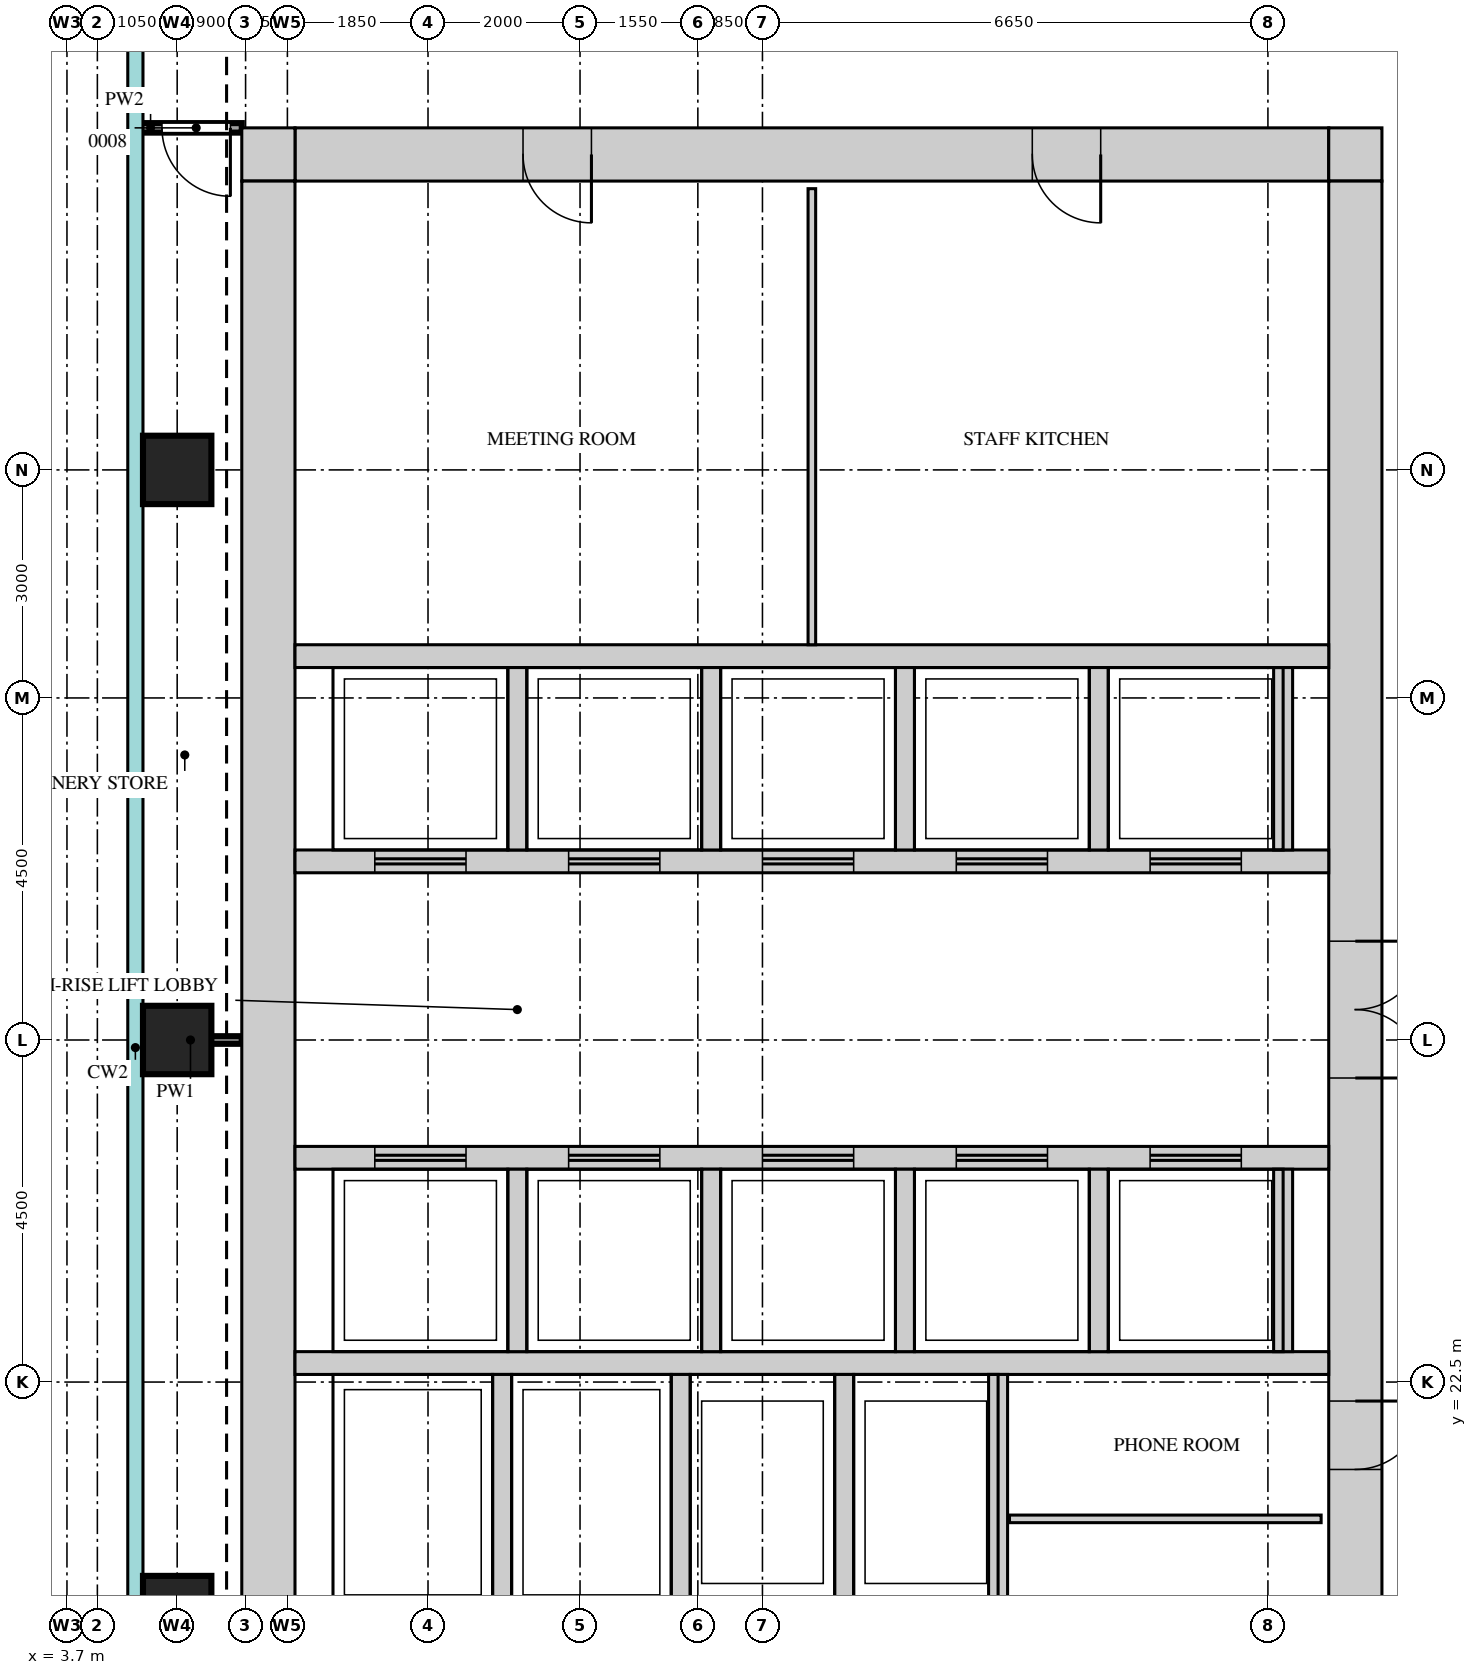
"""IFC4 building model, lengths in metres.
Left out: names, types, materials, properties, quantities, classifications, styles, units other than length and angle.
Written with IfcOpenShell. Run it as: python <this file> out.ifc"""

import sys

from ifc_helpers import new_model, si_unit, direction, frame, frame_2d, origin, origin_2d, place, context, subcontext, project, spatial, rectangle, extrude, source, transform, mapped, element, fill, save


model = new_model("IFC4")
c1 = context("Model", 3, precision=1e-05, world=origin(), true_north=direction((0.0, 1.0)))
c2 = subcontext(c1, "Body", "Model", "MODEL_VIEW")
j1 = project(units=[si_unit("LENGTHUNIT", "METRE"), si_unit("PLANEANGLEUNIT", "RADIAN")], contexts=[c1])
p1 = place(None, origin())
s1 = spatial("IfcSite", under=j1, at=p1, CompositionType="ELEMENT")
p2 = place(p1, origin())
s2 = spatial("IfcBuilding", under=s1, at=p2, CompositionType="ELEMENT")
p3 = place(p2, frame((0.0, 0.0, 226.2)))
s3 = spatial("IfcBuildingStorey", under=s2, at=p3, CompositionType="ELEMENT", Elevation=226.2)
m1 = source(origin(), c2, "Body", "SweptSolid", [
    extrude(rectangle(XDim=13.6, YDim=0.7, at=frame_2d((6.8, 0.0))), origin(), (0.0, 0.0, 1.0), 3.75),
])
p4 = place(p3, frame((6.7, 38.65, 0.0), z_axis=(0.0, 0.0, 1.0), x_axis=(1.0, 0.0, 0.0)))
e1 = element("IfcWall", 1, at=p4, inside=s3, PredefinedType="SHEAR", context=c2, shape_type="MappedRepresentation", body=[
    mapped(m1, transform((0.0, 0.0, 0.0))),
])
m2 = source(origin(), c2, "Body", "SweptSolid", [
    extrude(rectangle(XDim=0.9, YDim=2.1, at=frame_2d((0.45, 1.05))), frame((0.0, 0.36, 0.0), z_axis=(0.0, -1.0, 0.0), x_axis=(1.0, 0.0, 0.0)), (0.0, 0.0, 1.0), 0.72),
])
p5 = place(p4, frame((3.0, 0.0, 0.0)))
e2 = element("IfcOpeningElement", 2, at=p5, cuts=e1, PredefinedType="OPENING", context=c2, shape_type="MappedRepresentation", body=[
    mapped(m2, transform((0.0, 0.0, 0.0))),
])
p6 = place(p4, frame((9.7, 0.0, 0.0)))
e3 = element("IfcOpeningElement", 3, at=p6, cuts=e1, PredefinedType="OPENING", context=c2, shape_type="MappedRepresentation", body=[
    mapped(m2, transform((0.0, 0.0, 0.0))),
])
m3 = source(origin(), c2, "Body", "SweptSolid", [
    extrude(rectangle(XDim=0.7, YDim=0.7, at=frame_2d((0.35, 0.0))), origin(), (0.0, 0.0, 1.0), 3.75),
])
for number, where, z_axis, x_axis in (
    (4, (20.3, 38.65, 0.0), (0.0, 0.0, 1.0), (1.0, 0.0, 0.0)),
    (5, (6.0, 38.65, 0.0), (0.0, 0.0, 1.0), (1.0, 0.0, 0.0)),
):
    element("IfcWall", number, at=place(p3, frame(where, z_axis=z_axis, x_axis=x_axis)), inside=s3, PredefinedType="SHEAR", context=c2, shape_type="MappedRepresentation", body=[
        mapped(m3, transform((0.0, 0.0, 0.0))),
    ])
m4 = source(origin(), c2, "Body", "SweptSolid", [
    extrude(rectangle(XDim=22.6, YDim=0.7, at=frame_2d((11.3, 0.0))), origin(), (0.0, 0.0, 1.0), 3.75),
])
p7 = place(p3, frame((20.65, 15.7, 0.0), z_axis=(0.0, 0.0, 1.0), x_axis=(0.0, 1.0, 0.0)))
e6 = element("IfcWall", 6, at=p7, inside=s3, PredefinedType="SHEAR", context=c2, shape_type="MappedRepresentation", body=[
    mapped(m4, transform((0.0, 0.0, 0.0))),
])
m5 = source(origin(), c2, "Body", "SweptSolid", [
    extrude(rectangle(XDim=1.8, YDim=2.1, at=frame_2d((0.9, 1.05))), frame((0.0, 0.36, 0.0), z_axis=(0.0, -1.0, 0.0), x_axis=(1.0, 0.0, 0.0)), (0.0, 0.0, 1.0), 0.72),
])
p8 = place(p7, frame((10.8, 0.0, 0.0)))
e7 = element("IfcOpeningElement", 7, at=p8, cuts=e6, PredefinedType="OPENING", context=c2, shape_type="MappedRepresentation", body=[
    mapped(m5, transform((0.0, 0.0, 0.0))),
])
p9 = place(p7, frame((0.45, 0.0, 0.0)))
e8 = element("IfcOpeningElement", 8, at=p9, cuts=e6, PredefinedType="OPENING", context=c2, shape_type="MappedRepresentation", body=[
    mapped(m2, transform((0.0, 0.0, 0.0))),
])
p10 = place(p7, frame((2.9, 0.0, 0.0)))
e9 = element("IfcOpeningElement", 9, at=p10, cuts=e6, PredefinedType="OPENING", context=c2, shape_type="MappedRepresentation", body=[
    mapped(m2, transform((0.0, 0.0, 0.0))),
])
p11 = place(p7, frame((5.65, 0.0, 0.0)))
e10 = element("IfcOpeningElement", 10, at=p11, cuts=e6, PredefinedType="OPENING", context=c2, shape_type="MappedRepresentation", body=[
    mapped(m2, transform((0.0, 0.0, 0.0))),
])
p12 = place(p3, frame((6.35, 15.7, 0.0), z_axis=(0.0, 0.0, 1.0), x_axis=(0.0, 1.0, 0.0)))
e11 = element("IfcWall", 11, at=p12, inside=s3, PredefinedType="SHEAR", context=c2, shape_type="MappedRepresentation", body=[
    mapped(m4, transform((0.0, 0.0, 0.0))),
])
m6 = source(origin(), c2, "Body", "SweptSolid", [
    extrude(rectangle(XDim=13.6, YDim=0.3, at=frame_2d((6.8, 0.0))), origin(), (0.0, 0.0, 1.0), 3.75),
])
for number, where, z_axis, x_axis in (
    (12, (6.7, 22.75, 0.0), (0.0, 0.0, 1.0), (1.0, 0.0, 0.0)),
    (13, (6.7, 32.05, 0.0), (0.0, 0.0, 1.0), (1.0, 0.0, 0.0)),
):
    element("IfcWall", number, at=place(p3, frame(where, z_axis=z_axis, x_axis=x_axis)), inside=s3, PredefinedType="STANDARD", context=c2, shape_type="MappedRepresentation", body=[
        mapped(m6, transform((0.0, 0.0, 0.0))),
    ])
p13 = place(p3, frame((6.7, 29.35, 0.0), z_axis=(0.0, 0.0, 1.0), x_axis=(1.0, 0.0, 0.0)))
e14 = element("IfcWall", 14, at=p13, inside=s3, PredefinedType="STANDARD", context=c2, shape_type="MappedRepresentation", body=[
    mapped(m6, transform((0.0, 0.0, 0.0))),
])
m7 = source(origin(), c2, "Body", "SweptSolid", [
    extrude(rectangle(XDim=1.2, YDim=2.1, at=frame_2d((0.6, 1.05))), frame((0.0, 0.16, 0.0), z_axis=(0.0, -1.0, 0.0), x_axis=(1.0, 0.0, 0.0)), (0.0, 0.0, 1.0), 0.32),
])
p14 = place(p13, frame((1.05, 0.0, 0.0)))
e15 = element("IfcOpeningElement", 15, at=p14, cuts=e14, PredefinedType="OPENING", context=c2, shape_type="MappedRepresentation", body=[
    mapped(m7, transform((0.0, 0.0, 0.0))),
])
p15 = place(p13, frame((3.6, 0.0, 0.0)))
e16 = element("IfcOpeningElement", 16, at=p15, cuts=e14, PredefinedType="OPENING", context=c2, shape_type="MappedRepresentation", body=[
    mapped(m7, transform((0.0, 0.0, 0.0))),
])
p16 = place(p13, frame((6.15, 0.0, 0.0)))
e17 = element("IfcOpeningElement", 17, at=p16, cuts=e14, PredefinedType="OPENING", context=c2, shape_type="MappedRepresentation", body=[
    mapped(m7, transform((0.0, 0.0, 0.0))),
])
p17 = place(p13, frame((8.7, 0.0, 0.0)))
e18 = element("IfcOpeningElement", 18, at=p17, cuts=e14, PredefinedType="OPENING", context=c2, shape_type="MappedRepresentation", body=[
    mapped(m7, transform((0.0, 0.0, 0.0))),
])
p18 = place(p13, frame((11.25, 0.0, 0.0)))
e19 = element("IfcOpeningElement", 19, at=p18, cuts=e14, PredefinedType="OPENING", context=c2, shape_type="MappedRepresentation", body=[
    mapped(m7, transform((0.0, 0.0, 0.0))),
])
p19 = place(p3, frame((6.7, 25.45, 0.0), z_axis=(0.0, 0.0, 1.0), x_axis=(1.0, 0.0, 0.0)))
e20 = element("IfcWall", 20, at=p19, inside=s3, PredefinedType="STANDARD", context=c2, shape_type="MappedRepresentation", body=[
    mapped(m6, transform((0.0, 0.0, 0.0))),
])
p20 = place(p19, frame((1.05, 0.0, 0.0)))
e21 = element("IfcOpeningElement", 21, at=p20, cuts=e20, PredefinedType="OPENING", context=c2, shape_type="MappedRepresentation", body=[
    mapped(m7, transform((0.0, 0.0, 0.0))),
])
p21 = place(p19, frame((3.6, 0.0, 0.0)))
e22 = element("IfcOpeningElement", 22, at=p21, cuts=e20, PredefinedType="OPENING", context=c2, shape_type="MappedRepresentation", body=[
    mapped(m7, transform((0.0, 0.0, 0.0))),
])
p22 = place(p19, frame((6.15, 0.0, 0.0)))
e23 = element("IfcOpeningElement", 23, at=p22, cuts=e20, PredefinedType="OPENING", context=c2, shape_type="MappedRepresentation", body=[
    mapped(m7, transform((0.0, 0.0, 0.0))),
])
p23 = place(p19, frame((8.7, 0.0, 0.0)))
e24 = element("IfcOpeningElement", 24, at=p23, cuts=e20, PredefinedType="OPENING", context=c2, shape_type="MappedRepresentation", body=[
    mapped(m7, transform((0.0, 0.0, 0.0))),
])
p24 = place(p19, frame((11.25, 0.0, 0.0)))
e25 = element("IfcOpeningElement", 25, at=p24, cuts=e20, PredefinedType="OPENING", context=c2, shape_type="MappedRepresentation", body=[
    mapped(m7, transform((0.0, 0.0, 0.0))),
])
m8 = source(origin(), c2, "Body", "SweptSolid", [
    extrude(rectangle(XDim=3.1, YDim=0.25, at=frame_2d((1.55, 0.0))), origin(), (0.0, 0.0, 1.0), 3.75),
])
for number, where, z_axis, x_axis in (
    (26, (9.425, 19.5, 0.0), (0.0, 0.0, 1.0), (0.0, 1.0, 0.0)),
    (27, (11.775, 19.5, 0.0), (0.0, 0.0, 1.0), (0.0, 1.0, 0.0)),
    (28, (13.925, 19.5, 0.0), (0.0, 0.0, 1.0), (0.0, 1.0, 0.0)),
    (29, (15.95, 19.5, 0.0), (0.0, 0.0, 1.0), (0.0, 1.0, 0.0)),
):
    element("IfcWall", number, at=place(p3, frame(where, z_axis=z_axis, x_axis=x_axis)), inside=s3, PredefinedType="STANDARD", context=c2, shape_type="MappedRepresentation", body=[
        mapped(m8, transform((0.0, 0.0, 0.0))),
    ])
m9 = source(origin(), c2, "Body", "SweptSolid", [
    extrude(rectangle(XDim=2.4, YDim=0.25, at=frame_2d((1.2, 0.0))), origin(), (0.0, 0.0, 1.0), 3.75),
])
for number, where, z_axis, x_axis in (
    (30, (17.275, 29.5, 0.0), (0.0, 0.0, 1.0), (0.0, 1.0, 0.0)),
    (31, (19.7, 29.5, 0.0), (0.0, 0.0, 1.0), (0.0, 1.0, 0.0)),
    (32, (9.625, 29.5, 0.0), (0.0, 0.0, 1.0), (0.0, 1.0, 0.0)),
    (33, (12.175, 29.5, 0.0), (0.0, 0.0, 1.0), (0.0, 1.0, 0.0)),
    (34, (14.725, 29.5, 0.0), (0.0, 0.0, 1.0), (0.0, 1.0, 0.0)),
):
    element("IfcWall", number, at=place(p3, frame(where, z_axis=z_axis, x_axis=x_axis)), inside=s3, PredefinedType="STANDARD", context=c2, shape_type="MappedRepresentation", body=[
        mapped(m9, transform((0.0, 0.0, 0.0))),
    ])
m10 = source(origin(), c2, "Body", "SweptSolid", [
    extrude(rectangle(XDim=2.4, YDim=0.25, at=frame_2d((1.2, 0.0))), origin(), (0.0, 0.0, 1.0), 3.75),
])
for number, where, z_axis, x_axis in (
    (35, (17.275, 22.9, 0.0), (0.0, 0.0, 1.0), (0.0, 1.0, 0.0)),
    (36, (19.7, 22.9, 0.0), (0.0, 0.0, 1.0), (0.0, 1.0, 0.0)),
    (37, (9.625, 22.9, 0.0), (0.0, 0.0, 1.0), (0.0, 1.0, 0.0)),
    (38, (12.175, 22.9, 0.0), (0.0, 0.0, 1.0), (0.0, 1.0, 0.0)),
    (39, (14.725, 22.9, 0.0), (0.0, 0.0, 1.0), (0.0, 1.0, 0.0)),
):
    element("IfcWall", number, at=place(p3, frame(where, z_axis=z_axis, x_axis=x_axis)), inside=s3, PredefinedType="STANDARD", context=c2, shape_type="MappedRepresentation", body=[
        mapped(m10, transform((0.0, 0.0, 0.0))),
    ])
m11 = source(origin(), c2, "Body", "SweptSolid", [
    extrude(rectangle(XDim=0.9, YDim=0.9, at=origin_2d()), origin(), (0.0, 0.0, 1.0), 3.75),
])
for number, where, z_axis, x_axis in (
    (40, (5.15, 19.5, 0.0), (0.0, 0.0, 1.0), (1.0, 0.0, 0.0)),
    (41, (5.15, 27.0, 0.0), (0.0, 0.0, 1.0), (1.0, 0.0, 0.0)),
    (42, (5.15, 34.5, 0.0), (0.0, 0.0, 1.0), (1.0, 0.0, 0.0)),
):
    element("IfcColumn", number, at=place(p3, frame(where, z_axis=z_axis, x_axis=x_axis)), inside=s3, PredefinedType="COLUMN", context=c2, shape_type="MappedRepresentation", body=[
        mapped(m11, transform((0.0, 0.0, 0.0))),
    ])
m12 = source(origin(), c2, "Body", "SweptSolid", [
    extrude(rectangle(XDim=4.1, YDim=0.1, at=frame_2d((2.05, 0.0))), origin(), (0.0, 0.0, 1.0), 3.8),
])
p25 = place(p3, frame((16.1, 20.7, 0.0), z_axis=(0.0, 0.0, 1.0), x_axis=(1.0, 0.0, 0.0)))
e43 = element("IfcWall", 43, at=p25, inside=s3, PredefinedType="PARTITIONING", context=c2, shape_type="MappedRepresentation", body=[
    mapped(m12, transform((0.0, 0.0, 0.0))),
])
m13 = source(origin(), c2, "Body", "SweptSolid", [
    extrude(rectangle(XDim=1.35, YDim=0.1, at=frame_2d((0.675, 0.0))), origin(), (0.0, 0.0, 1.0), 3.8),
])
p26 = place(p3, frame((4.65, 27.0, 0.0), z_axis=(0.0, 0.0, 1.0), x_axis=(1.0, 0.0, 0.0)))
e44 = element("IfcWall", 44, at=p26, inside=s3, PredefinedType="PARTITIONING", context=c2, shape_type="MappedRepresentation", body=[
    mapped(m13, transform((0.0, 0.0, 0.0))),
])
m14 = source(origin(), c2, "Body", "SweptSolid", [
    extrude(rectangle(XDim=6.0, YDim=0.1, at=frame_2d((3.0, 0.0))), origin(), (0.0, 0.0, 1.0), 3.8),
])
p27 = place(p3, frame((13.5, 32.2, 0.0), z_axis=(0.0, 0.0, 1.0), x_axis=(0.0, 1.0, 0.0)))
e45 = element("IfcWall", 45, at=p27, inside=s3, PredefinedType="PARTITIONING", context=c2, shape_type="MappedRepresentation", body=[
    mapped(m14, transform((0.0, 0.0, 0.0))),
])
m15 = source(origin(), c2, "Body", "SweptSolid", [
    extrude(rectangle(XDim=1.35, YDim=0.125, at=frame_2d((0.675, 0.0))), origin(), (0.0, 0.0, 1.0), 3.8),
])
p28 = place(p3, frame((4.65, 39.0, 0.0), z_axis=(0.0, 0.0, 1.0), x_axis=(1.0, 0.0, 0.0)))
e46 = element("IfcWall", 46, at=p28, inside=s3, PredefinedType="PARTITIONING", context=c2, shape_type="MappedRepresentation", body=[
    mapped(m15, transform((0.0, 0.0, 0.0))),
])
m16 = source(origin(), c2, "Body", "SweptSolid", [
    extrude(rectangle(XDim=0.9, YDim=2.1, at=frame_2d((0.45, 1.05))), frame((0.0, 0.073, 0.0), z_axis=(0.0, -1.0, 0.0), x_axis=(1.0, 0.0, 0.0)), (0.0, 0.0, 1.0), 0.145),
])
p29 = place(p28, frame((0.3, 0.0, 0.0)))
e47 = element("IfcOpeningElement", 47, at=p29, cuts=e46, PredefinedType="OPENING", context=c2, shape_type="MappedRepresentation", body=[
    mapped(m16, transform((0.0, 0.0, 0.0))),
])
m17 = source(origin(), c2, "Body", "SweptSolid", [
    extrude(rectangle(XDim=1.8, YDim=2.1, at=frame_2d((0.9, 1.05))), frame((0.0, 0.3, 0.0), z_axis=(0.0, -1.0, 0.0), x_axis=(1.0, 0.0, 0.0)), (0.0, 0.0, 1.0), 0.6),
])
p30 = place(p8, origin())
e48 = element("IfcDoor", 48, at=p30, inside=s3, OperationType="DOUBLE_DOOR_SINGLE_SWING", PredefinedType="DOOR", context=c2, shape_type="MappedRepresentation", body=[
    mapped(m17, transform((0.0, 0.0, 0.0))),
])
fill(e7, e48)
m18 = source(origin(), c2, "Body", "SweptSolid", [
    extrude(rectangle(XDim=0.9, YDim=2.1, at=frame_2d((0.45, 1.05))), frame((0.0, 0.3, 0.0), z_axis=(0.0, -1.0, 0.0), x_axis=(1.0, 0.0, 0.0)), (0.0, 0.0, 1.0), 0.6),
])
p31 = place(p5, origin())
e49 = element("IfcDoor", 49, at=p31, inside=s3, OperationType="SINGLE_SWING_RIGHT", PredefinedType="DOOR", context=c2, shape_type="MappedRepresentation", body=[
    mapped(m18, transform((0.0, 0.0, 0.0))),
])
fill(e2, e49)
p32 = place(p6, origin())
e50 = element("IfcDoor", 50, at=p32, inside=s3, OperationType="SINGLE_SWING_RIGHT", PredefinedType="DOOR", context=c2, shape_type="MappedRepresentation", body=[
    mapped(m18, transform((0.0, 0.0, 0.0))),
])
fill(e3, e50)
p33 = place(p11, origin())
e51 = element("IfcDoor", 51, at=p33, inside=s3, OperationType="SINGLE_SWING_RIGHT", PredefinedType="DOOR", context=c2, shape_type="MappedRepresentation", body=[
    mapped(m18, transform((0.0, 0.0, 0.0))),
])
fill(e10, e51)
m19 = source(origin(), c2, "Body", "SweptSolid", [
    extrude(rectangle(XDim=0.9, YDim=2.1, at=frame_2d((0.45, 1.05))), frame((0.0, 0.025, 0.0), z_axis=(0.0, -1.0, 0.0), x_axis=(1.0, 0.0, 0.0)), (0.0, 0.0, 1.0), 0.05),
])
p34 = place(p29, origin())
e52 = element("IfcDoor", 52, at=p34, inside=s3, OperationType="SINGLE_SWING_RIGHT", PredefinedType="DOOR", context=c2, shape_type="MappedRepresentation", body=[
    mapped(m19, transform((0.0, 0.0, 0.0))),
])
fill(e47, e52)
m20 = source(origin(), c2, "Body", "SweptSolid", [
    extrude(rectangle(XDim=1.2, YDim=2.1, at=frame_2d((0.6, 1.05))), frame((0.0, 0.025, 0.0), z_axis=(0.0, -1.0, 0.0), x_axis=(1.0, 0.0, 0.0)), (0.0, 0.0, 1.0), 0.05),
])
p35 = place(p20, origin())
e53 = element("IfcDoor", 53, at=p35, inside=s3, OperationType="DOUBLE_DOOR_SLIDING", PredefinedType="DOOR", context=c2, shape_type="MappedRepresentation", body=[
    mapped(m20, transform((0.0, 0.0, 0.0))),
])
fill(e21, e53)
p36 = place(p21, origin())
e54 = element("IfcDoor", 54, at=p36, inside=s3, OperationType="DOUBLE_DOOR_SLIDING", PredefinedType="DOOR", context=c2, shape_type="MappedRepresentation", body=[
    mapped(m20, transform((0.0, 0.0, 0.0))),
])
fill(e22, e54)
p37 = place(p22, origin())
e55 = element("IfcDoor", 55, at=p37, inside=s3, OperationType="DOUBLE_DOOR_SLIDING", PredefinedType="DOOR", context=c2, shape_type="MappedRepresentation", body=[
    mapped(m20, transform((0.0, 0.0, 0.0))),
])
fill(e23, e55)
p38 = place(p23, origin())
e56 = element("IfcDoor", 56, at=p38, inside=s3, OperationType="DOUBLE_DOOR_SLIDING", PredefinedType="DOOR", context=c2, shape_type="MappedRepresentation", body=[
    mapped(m20, transform((0.0, 0.0, 0.0))),
])
fill(e24, e56)
p39 = place(p24, origin())
e57 = element("IfcDoor", 57, at=p39, inside=s3, OperationType="DOUBLE_DOOR_SLIDING", PredefinedType="DOOR", context=c2, shape_type="MappedRepresentation", body=[
    mapped(m20, transform((0.0, 0.0, 0.0))),
])
fill(e25, e57)
p40 = place(p14, origin())
e58 = element("IfcDoor", 58, at=p40, inside=s3, OperationType="DOUBLE_DOOR_SLIDING", PredefinedType="DOOR", context=c2, shape_type="MappedRepresentation", body=[
    mapped(m20, transform((0.0, 0.0, 0.0))),
])
fill(e15, e58)
p41 = place(p15, origin())
e59 = element("IfcDoor", 59, at=p41, inside=s3, OperationType="DOUBLE_DOOR_SLIDING", PredefinedType="DOOR", context=c2, shape_type="MappedRepresentation", body=[
    mapped(m20, transform((0.0, 0.0, 0.0))),
])
fill(e16, e59)
p42 = place(p16, origin())
e60 = element("IfcDoor", 60, at=p42, inside=s3, OperationType="DOUBLE_DOOR_SLIDING", PredefinedType="DOOR", context=c2, shape_type="MappedRepresentation", body=[
    mapped(m20, transform((0.0, 0.0, 0.0))),
])
fill(e17, e60)
p43 = place(p17, origin())
e61 = element("IfcDoor", 61, at=p43, inside=s3, OperationType="DOUBLE_DOOR_SLIDING", PredefinedType="DOOR", context=c2, shape_type="MappedRepresentation", body=[
    mapped(m20, transform((0.0, 0.0, 0.0))),
])
fill(e18, e61)
p44 = place(p18, origin())
e62 = element("IfcDoor", 62, at=p44, inside=s3, OperationType="DOUBLE_DOOR_SLIDING", PredefinedType="DOOR", context=c2, shape_type="MappedRepresentation", body=[
    mapped(m20, transform((0.0, 0.0, 0.0))),
])
fill(e19, e62)
save(model, sys.argv[1])
